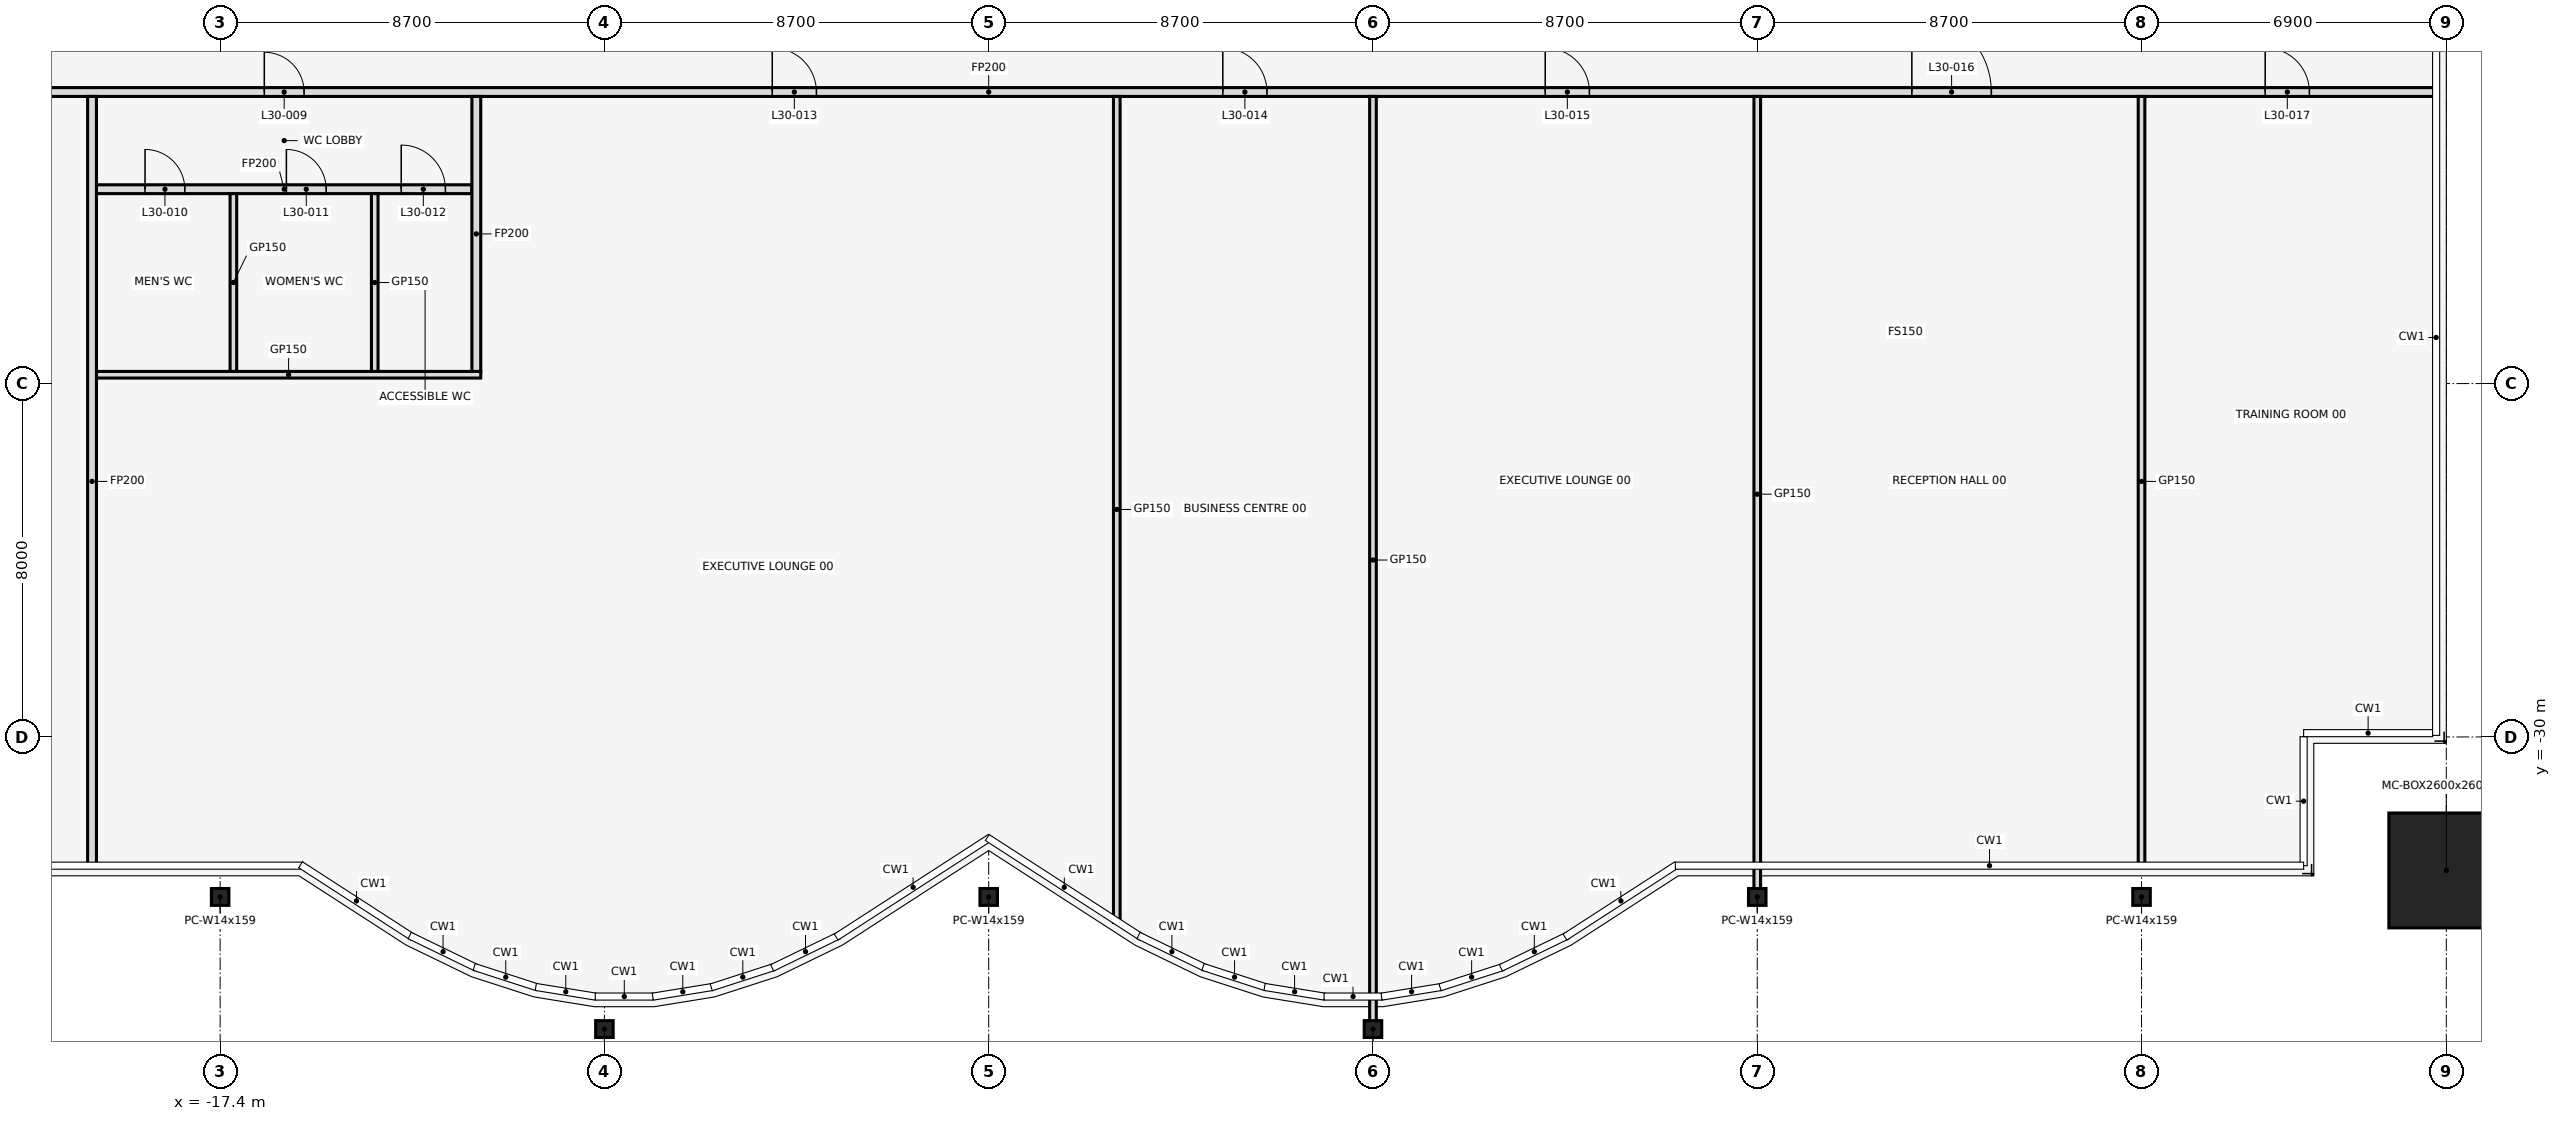
"""IFC4 building model, lengths in metres.
Left out: names, types, materials, properties, quantities, classifications, styles, units other than length and angle.
Written with IfcOpenShell. Run it as: python <this file> out.ifc"""

import sys

from ifc_helpers import new_model, si_unit, direction, frame, frame_2d, origin, origin_2d, place, context, subcontext, project, spatial, rectangle, hollow_rectangle, i_section, extrude, element, fill, save


model = new_model("IFC4")
c1 = context("Model", 3, precision=1e-05, world=origin(), true_north=direction((0.0, 1.0)))
c2 = subcontext(c1, "Body", "Model", "MODEL_VIEW")
j1 = project(units=[si_unit("LENGTHUNIT", "METRE"), si_unit("PLANEANGLEUNIT", "RADIAN")], contexts=[c1])
p1 = place(None, origin())
s1 = spatial("IfcSite", under=j1, at=p1, CompositionType="ELEMENT")
p2 = place(p1, origin())
s2 = spatial("IfcBuilding", under=s1, at=p2, CompositionType="ELEMENT")
p3 = place(p2, frame((0.0, 0.0, 140.4)))
s3 = spatial("IfcBuildingStorey", under=s2, at=p3, CompositionType="ELEMENT", Elevation=140.4)
for number, where, z_axis, x_axis in (
    (1, (-17.4, -33.622, 0.0), (0.0, 0.0, 1.0), (1.0, 0.0, 0.0)),
    (2, (-8.7, -36.613, 0.0), (0.0, 0.0, 1.0), (1.0, 0.0, 0.0)),
    (3, (0.0, -33.622, 0.0), (0.0, 0.0, 1.0), (1.0, 0.0, 0.0)),
    (4, (8.7, -36.613, 0.0), (0.0, 0.0, 1.0), (1.0, 0.0, 0.0)),
    (5, (17.4, -33.622, 0.0), (0.0, 0.0, 1.0), (1.0, 0.0, 0.0)),
    (6, (26.1, -33.622, 0.0), (0.0, 0.0, 1.0), (1.0, 0.0, 0.0)),
):
    element("IfcColumn", number, at=place(p3, frame(where, z_axis=z_axis, x_axis=x_axis)), inside=s3, PredefinedType="COLUMN", context=c2, shape_type="SweptSolid", body=[
        extrude(i_section(OverallWidth=0.396, OverallDepth=0.381, WebThickness=0.019, FlangeThickness=0.03, at=origin_2d()), origin(), (0.0, 0.0, 1.0), 4.1),
    ])
p4 = place(p3, frame((33.0, -33.022, 0.0), z_axis=(0.0, 0.0, 1.0), x_axis=(1.0, 0.0, 0.0)))
e7 = element("IfcColumn", 7, at=p4, inside=s3, PredefinedType="COLUMN", context=c2, shape_type="SweptSolid", body=[
    extrude(hollow_rectangle(XDim=2.6, YDim=2.6, WallThickness=0.08, at=origin_2d()), origin(), (0.0, 0.0, 1.0), 4.1),
])
p5 = place(p3, frame((-20.2, -21.8, 0.0), z_axis=(0.0, 0.0, 1.0), x_axis=(1.0, 0.0, 0.0)))
e8 = element("IfcWall", 8, at=p5, inside=s3, PredefinedType="PARTITIONING", context=c2, shape_type="SweptSolid", body=[
    extrude(rectangle(XDim=8.7, YDim=0.15, at=frame_2d((4.35, 0.0))), origin(), (0.0, 0.0, 1.0), 2.939),
])
p6 = place(p3, frame((-20.2, -17.6, 0.0), z_axis=(0.0, 0.0, 1.0), x_axis=(1.0, 0.0, 0.0)))
e9 = element("IfcWall", 9, at=p6, inside=s3, PredefinedType="PARTITIONING", context=c2, shape_type="SweptSolid", body=[
    extrude(rectangle(XDim=8.5, YDim=0.2, at=frame_2d((4.25, 0.0))), origin(), (0.0, 0.0, 1.0), 2.939),
])
p7 = place(p6, frame((1.1, 0.0, 0.0)))
e10 = element("IfcOpeningElement", 10, at=p7, cuts=e9, PredefinedType="OPENING", context=c2, shape_type="SweptSolid", body=[
    extrude(rectangle(XDim=0.9, YDim=2.1, at=frame_2d((0.45, 1.05))), frame((0.0, 0.112, 0.0), z_axis=(0.0, -1.0, 0.0), x_axis=(1.0, 0.0, 0.0)), (0.0, 0.0, 1.0), 0.224),
])
p8 = place(p6, frame((4.3, 0.0, 0.0)))
e11 = element("IfcOpeningElement", 11, at=p8, cuts=e9, PredefinedType="OPENING", context=c2, shape_type="SweptSolid", body=[
    extrude(rectangle(XDim=0.9, YDim=2.1, at=frame_2d((0.45, 1.05))), frame((0.0, 0.112, 0.0), z_axis=(0.0, -1.0, 0.0), x_axis=(1.0, 0.0, 0.0)), (0.0, 0.0, 1.0), 0.224),
])
p9 = place(p6, frame((6.9, 0.0, 0.0)))
e12 = element("IfcOpeningElement", 12, at=p9, cuts=e9, PredefinedType="OPENING", context=c2, shape_type="SweptSolid", body=[
    extrude(rectangle(XDim=1.0, YDim=2.1, at=frame_2d((0.5, 1.05))), frame((0.0, 0.112, 0.0), z_axis=(0.0, -1.0, 0.0), x_axis=(1.0, 0.0, 0.0)), (0.0, 0.0, 1.0), 0.224),
])
p10 = place(p3, frame((-32.79, -15.4, 0.0), z_axis=(0.0, 0.0, 1.0), x_axis=(1.0, 0.0, 0.0)))
e13 = element("IfcWall", 13, at=p10, inside=s3, PredefinedType="PARTITIONING", context=c2, shape_type="SweptSolid", body=[
    extrude(rectangle(XDim=65.58, YDim=0.2, at=frame_2d((32.79, 0.0))), origin(), (0.0, 0.0, 1.0), 2.939),
])
p11 = place(p10, frame((2.8, 0.0, 0.0)))
e14 = element("IfcOpeningElement", 14, at=p11, cuts=e13, PredefinedType="OPENING", context=c2, shape_type="SweptSolid", body=[
    extrude(rectangle(XDim=1.0, YDim=2.1, at=frame_2d((0.5, 1.05))), frame((0.0, 0.112, 0.0), z_axis=(0.0, -1.0, 0.0), x_axis=(1.0, 0.0, 0.0)), (0.0, 0.0, 1.0), 0.224),
])
p12 = place(p10, frame((9.09, 0.0, 0.0)))
e15 = element("IfcOpeningElement", 15, at=p12, cuts=e13, PredefinedType="OPENING", context=c2, shape_type="SweptSolid", body=[
    extrude(rectangle(XDim=1.0, YDim=2.1, at=frame_2d((0.5, 1.05))), frame((0.0, 0.112, 0.0), z_axis=(0.0, -1.0, 0.0), x_axis=(1.0, 0.0, 0.0)), (0.0, 0.0, 1.0), 0.224),
])
p13 = place(p10, frame((16.39, 0.0, 0.0)))
e16 = element("IfcOpeningElement", 16, at=p13, cuts=e13, PredefinedType="OPENING", context=c2, shape_type="SweptSolid", body=[
    extrude(rectangle(XDim=0.9, YDim=2.1, at=frame_2d((0.45, 1.05))), frame((0.0, 0.112, 0.0), z_axis=(0.0, -1.0, 0.0), x_axis=(1.0, 0.0, 0.0)), (0.0, 0.0, 1.0), 0.224),
])
p14 = place(p10, frame((27.89, 0.0, 0.0)))
e17 = element("IfcOpeningElement", 17, at=p14, cuts=e13, PredefinedType="OPENING", context=c2, shape_type="SweptSolid", body=[
    extrude(rectangle(XDim=1.0, YDim=2.1, at=frame_2d((0.5, 1.05))), frame((0.0, 0.112, 0.0), z_axis=(0.0, -1.0, 0.0), x_axis=(1.0, 0.0, 0.0)), (0.0, 0.0, 1.0), 0.224),
])
p15 = place(p10, frame((38.09, 0.0, 0.0)))
e18 = element("IfcOpeningElement", 18, at=p15, cuts=e13, PredefinedType="OPENING", context=c2, shape_type="SweptSolid", body=[
    extrude(rectangle(XDim=1.0, YDim=2.1, at=frame_2d((0.5, 1.05))), frame((0.0, 0.112, 0.0), z_axis=(0.0, -1.0, 0.0), x_axis=(1.0, 0.0, 0.0)), (0.0, 0.0, 1.0), 0.224),
])
p16 = place(p10, frame((45.39, 0.0, 0.0)))
e19 = element("IfcOpeningElement", 19, at=p16, cuts=e13, PredefinedType="OPENING", context=c2, shape_type="SweptSolid", body=[
    extrude(rectangle(XDim=1.0, YDim=2.1, at=frame_2d((0.5, 1.05))), frame((0.0, 0.112, 0.0), z_axis=(0.0, -1.0, 0.0), x_axis=(1.0, 0.0, 0.0)), (0.0, 0.0, 1.0), 0.224),
])
p17 = place(p10, frame((53.69, 0.0, 0.0)))
e20 = element("IfcOpeningElement", 20, at=p17, cuts=e13, PredefinedType="OPENING", context=c2, shape_type="SweptSolid", body=[
    extrude(rectangle(XDim=1.8, YDim=2.1, at=frame_2d((0.9, 1.05))), frame((0.0, 0.112, 0.0), z_axis=(0.0, -1.0, 0.0), x_axis=(1.0, 0.0, 0.0)), (0.0, 0.0, 1.0), 0.224),
])
p18 = place(p10, frame((61.69, 0.0, 0.0)))
e21 = element("IfcOpeningElement", 21, at=p18, cuts=e13, PredefinedType="OPENING", context=c2, shape_type="SweptSolid", body=[
    extrude(rectangle(XDim=1.0, YDim=2.1, at=frame_2d((0.5, 1.05))), frame((0.0, 0.112, 0.0), z_axis=(0.0, -1.0, 0.0), x_axis=(1.0, 0.0, 0.0)), (0.0, 0.0, 1.0), 0.224),
])
p19 = place(p3, frame((-20.3, -32.93, 0.0), z_axis=(0.0, 0.0, 1.0), x_axis=(0.0, 1.0, 0.0)))
e22 = element("IfcWall", 22, at=p19, inside=s3, PredefinedType="PARTITIONING", context=c2, shape_type="SweptSolid", body=[
    extrude(rectangle(XDim=17.43, YDim=0.2, at=frame_2d((8.715, 0.0))), origin(), (0.0, 0.0, 1.0), 2.939),
])
for number, where, z_axis, x_axis in (
    (23, (-17.1, -21.725, 0.0), (0.0, 0.0, 1.0), (0.0, 1.0, 0.0)),
    (24, (-13.9, -21.725, 0.0), (0.0, 0.0, 1.0), (0.0, 1.0, 0.0)),
):
    element("IfcWall", number, at=place(p3, frame(where, z_axis=z_axis, x_axis=x_axis)), inside=s3, PredefinedType="PARTITIONING", context=c2, shape_type="SweptSolid", body=[
        extrude(rectangle(XDim=4.025, YDim=0.15, at=frame_2d((2.013, 0.0))), origin(), (0.0, 0.0, 1.0), 2.939),
    ])
p20 = place(p3, frame((-11.6, -21.725, 0.0), z_axis=(0.0, 0.0, 1.0), x_axis=(0.0, 1.0, 0.0)))
e25 = element("IfcWall", 25, at=p20, inside=s3, PredefinedType="PARTITIONING", context=c2, shape_type="SweptSolid", body=[
    extrude(rectangle(XDim=6.225, YDim=0.2, at=frame_2d((3.113, 0.0))), origin(), (0.0, 0.0, 1.0), 2.939),
])
p21 = place(p3, frame((2.9, -34.2, 0.0), z_axis=(0.0, 0.0, 1.0), x_axis=(0.0, 1.0, 0.0)))
e26 = element("IfcWall", 26, at=p21, inside=s3, PredefinedType="PARTITIONING", context=c2, shape_type="SweptSolid", body=[
    extrude(rectangle(XDim=18.7, YDim=0.15, at=frame_2d((9.35, 0.0))), origin(), (0.0, 0.0, 1.0), 2.939),
])
p22 = place(p3, frame((8.7, -36.489, 0.0), z_axis=(0.0, 0.0, 1.0), x_axis=(0.0, 1.0, 0.0)))
e27 = element("IfcWall", 27, at=p22, inside=s3, PredefinedType="PARTITIONING", context=c2, shape_type="SweptSolid", body=[
    extrude(rectangle(XDim=20.989, YDim=0.15, at=frame_2d((10.495, 0.0))), origin(), (0.0, 0.0, 1.0), 2.939),
])
p23 = place(p3, frame((17.4, -33.508, 0.0), z_axis=(0.0, 0.0, 1.0), x_axis=(0.0, 1.0, 0.0)))
e28 = element("IfcWall", 28, at=p23, inside=s3, PredefinedType="PARTITIONING", context=c2, shape_type="SweptSolid", body=[
    extrude(rectangle(XDim=18.008, YDim=0.15, at=frame_2d((9.004, 0.0))), origin(), (0.0, 0.0, 1.0), 2.939),
])
p24 = place(p3, frame((26.1, -32.93, 0.0), z_axis=(0.0, 0.0, 1.0), x_axis=(0.0, 1.0, 0.0)))
e29 = element("IfcWall", 29, at=p24, inside=s3, PredefinedType="PARTITIONING", context=c2, shape_type="SweptSolid", body=[
    extrude(rectangle(XDim=17.43, YDim=0.15, at=frame_2d((8.715, 0.0))), origin(), (0.0, 0.0, 1.0), 2.939),
])
p25 = place(p13, frame((0.9, 0.0, 0.0), z_axis=(0.0, 0.0, 1.0), x_axis=(-1.0, 0.0, 0.0)))
e30 = element("IfcDoor", 30, at=p25, inside=s3, OperationType="SINGLE_SWING_RIGHT", PredefinedType="DOOR", context=c2, shape_type="SweptSolid", body=[
    extrude(rectangle(XDim=0.9, YDim=2.1, at=frame_2d((0.45, 1.05))), frame((0.0, 0.025, 0.0), z_axis=(0.0, -1.0, 0.0), x_axis=(1.0, 0.0, 0.0)), (0.0, 0.0, 1.0), 0.05),
])
fill(e16, e30)
p26 = place(p7, frame((0.9, 0.0, 0.0), z_axis=(0.0, 0.0, 1.0), x_axis=(-1.0, 0.0, 0.0)))
e31 = element("IfcDoor", 31, at=p26, inside=s3, OperationType="SINGLE_SWING_LEFT", PredefinedType="DOOR", context=c2, shape_type="SweptSolid", body=[
    extrude(rectangle(XDim=0.9, YDim=2.1, at=frame_2d((0.45, 1.05))), frame((0.0, 0.025, 0.0), z_axis=(0.0, -1.0, 0.0), x_axis=(1.0, 0.0, 0.0)), (0.0, 0.0, 1.0), 0.05),
])
fill(e10, e31)
p27 = place(p8, frame((0.9, 0.0, 0.0), z_axis=(0.0, 0.0, 1.0), x_axis=(-1.0, 0.0, 0.0)))
e32 = element("IfcDoor", 32, at=p27, inside=s3, OperationType="SINGLE_SWING_RIGHT", PredefinedType="DOOR", context=c2, shape_type="SweptSolid", body=[
    extrude(rectangle(XDim=0.9, YDim=2.1, at=frame_2d((0.45, 1.05))), frame((0.0, 0.025, 0.0), z_axis=(0.0, -1.0, 0.0), x_axis=(1.0, 0.0, 0.0)), (0.0, 0.0, 1.0), 0.05),
])
fill(e11, e32)
p28 = place(p9, frame((1.0, 0.0, 0.0), z_axis=(0.0, 0.0, 1.0), x_axis=(-1.0, 0.0, 0.0)))
e33 = element("IfcDoor", 33, at=p28, inside=s3, OperationType="SINGLE_SWING_RIGHT", PredefinedType="DOOR", context=c2, shape_type="SweptSolid", body=[
    extrude(rectangle(XDim=1.0, YDim=2.1, at=frame_2d((0.5, 1.05))), frame((0.0, 0.025, 0.0), z_axis=(0.0, -1.0, 0.0), x_axis=(1.0, 0.0, 0.0)), (0.0, 0.0, 1.0), 0.05),
])
fill(e12, e33)
p29 = place(p14, frame((1.0, 0.0, 0.0), z_axis=(0.0, 0.0, 1.0), x_axis=(-1.0, 0.0, 0.0)))
e34 = element("IfcDoor", 34, at=p29, inside=s3, OperationType="SINGLE_SWING_LEFT", PredefinedType="DOOR", context=c2, shape_type="SweptSolid", body=[
    extrude(rectangle(XDim=1.0, YDim=2.1, at=frame_2d((0.5, 1.05))), frame((0.0, 0.025, 0.0), z_axis=(0.0, -1.0, 0.0), x_axis=(1.0, 0.0, 0.0)), (0.0, 0.0, 1.0), 0.05),
])
fill(e17, e34)
p30 = place(p15, frame((1.0, 0.0, 0.0), z_axis=(0.0, 0.0, 1.0), x_axis=(-1.0, 0.0, 0.0)))
e35 = element("IfcDoor", 35, at=p30, inside=s3, OperationType="SINGLE_SWING_RIGHT", PredefinedType="DOOR", context=c2, shape_type="SweptSolid", body=[
    extrude(rectangle(XDim=1.0, YDim=2.1, at=frame_2d((0.5, 1.05))), frame((0.0, 0.025, 0.0), z_axis=(0.0, -1.0, 0.0), x_axis=(1.0, 0.0, 0.0)), (0.0, 0.0, 1.0), 0.05),
])
fill(e18, e35)
p31 = place(p16, frame((1.0, 0.0, 0.0), z_axis=(0.0, 0.0, 1.0), x_axis=(-1.0, 0.0, 0.0)))
e36 = element("IfcDoor", 36, at=p31, inside=s3, OperationType="SINGLE_SWING_RIGHT", PredefinedType="DOOR", context=c2, shape_type="SweptSolid", body=[
    extrude(rectangle(XDim=1.0, YDim=2.1, at=frame_2d((0.5, 1.05))), frame((0.0, 0.025, 0.0), z_axis=(0.0, -1.0, 0.0), x_axis=(1.0, 0.0, 0.0)), (0.0, 0.0, 1.0), 0.05),
])
fill(e19, e36)
p32 = place(p17, origin())
e37 = element("IfcDoor", 37, at=p32, inside=s3, OperationType="SINGLE_SWING_LEFT", PredefinedType="DOOR", context=c2, shape_type="SweptSolid", body=[
    extrude(rectangle(XDim=1.8, YDim=2.1, at=frame_2d((0.9, 1.05))), frame((0.0, 0.025, 0.0), z_axis=(0.0, -1.0, 0.0), x_axis=(1.0, 0.0, 0.0)), (0.0, 0.0, 1.0), 0.05),
])
fill(e20, e37)
p33 = place(p18, frame((1.0, 0.0, 0.0), z_axis=(0.0, 0.0, 1.0), x_axis=(-1.0, 0.0, 0.0)))
e38 = element("IfcDoor", 38, at=p33, inside=s3, OperationType="SINGLE_SWING_RIGHT", PredefinedType="DOOR", context=c2, shape_type="SweptSolid", body=[
    extrude(rectangle(XDim=1.0, YDim=2.1, at=frame_2d((0.5, 1.05))), frame((0.0, 0.025, 0.0), z_axis=(0.0, -1.0, 0.0), x_axis=(1.0, 0.0, 0.0)), (0.0, 0.0, 1.0), 0.05),
])
fill(e21, e38)
save(model, sys.argv[1])
